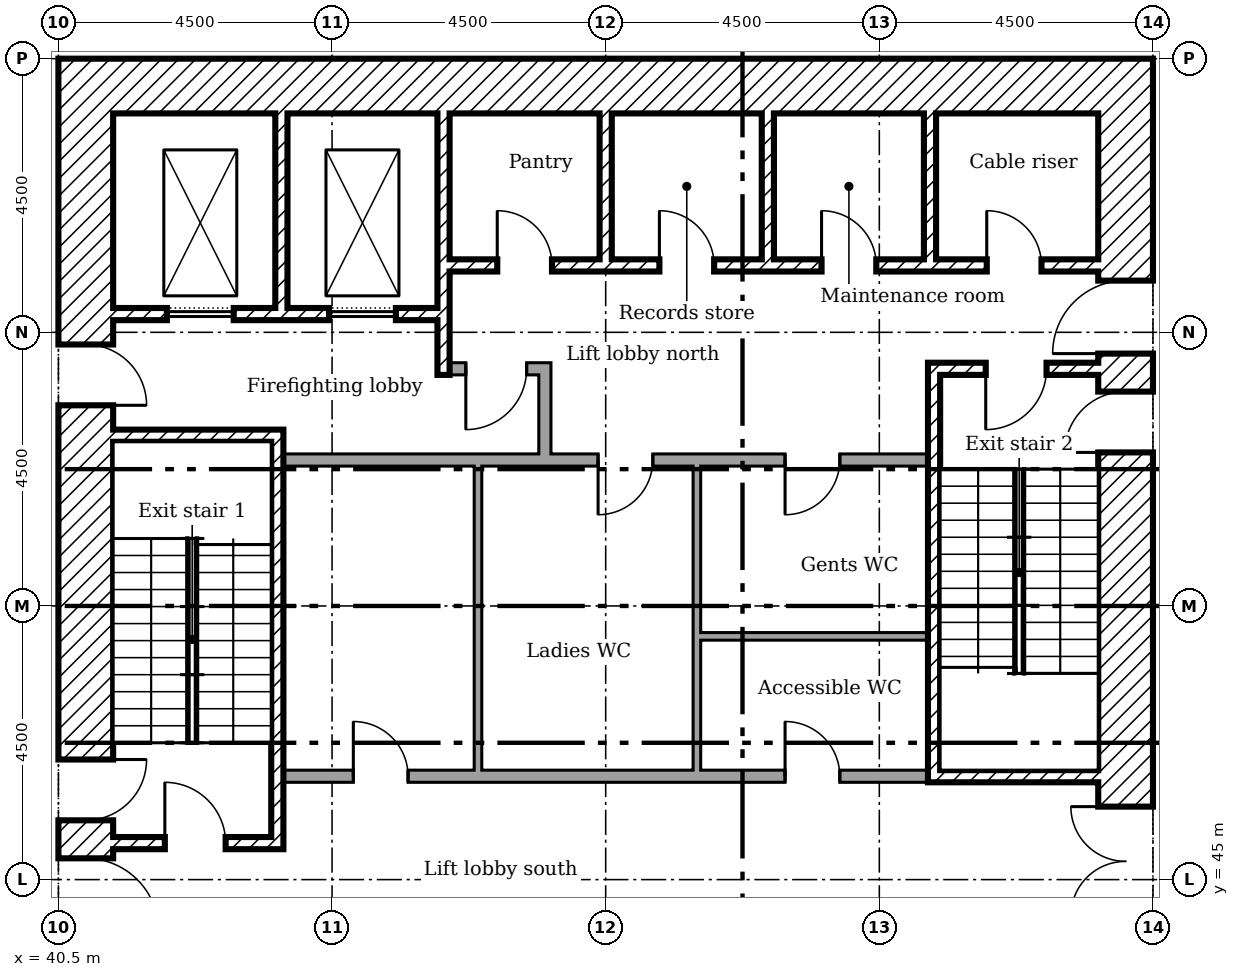
"""IFC4 building model, lengths in metres.
Left out: names, types, materials, properties, quantities, classifications, styles, units other than length and angle.
Written with IfcOpenShell. Run it as: python <this file> out.ifc"""

import sys

from ifc_helpers import new_model, si_unit, direction, frame, frame_2d, origin, place, context, subcontext, project, spatial, rectangle, extrude, element, fill, save


model = new_model("IFC4")
c1 = context("Model", 3, precision=1e-05, world=origin(), true_north=direction((0.0, 1.0)))
c2 = subcontext(c1, "Body", "Model", "MODEL_VIEW")
j1 = project(units=[si_unit("LENGTHUNIT", "METRE"), si_unit("PLANEANGLEUNIT", "RADIAN")], contexts=[c1])
p1 = place(None, origin())
s1 = spatial("IfcSite", under=j1, at=p1, CompositionType="ELEMENT")
p2 = place(p1, origin())
s2 = spatial("IfcBuilding", under=s1, at=p2, CompositionType="ELEMENT")
p3 = place(p2, frame((0.0, 0.0, 29.8)))
s3 = spatial("IfcBuildingStorey", under=s2, at=p3, CompositionType="ELEMENT", Elevation=29.8)
p4 = place(p3, frame((58.05, 40.5, 0.0), z_axis=(0.0, 0.0, 1.0), x_axis=(0.0, 1.0, 0.0)))
e1 = element("IfcWall", 1, at=p4, inside=s3, PredefinedType="SHEAR", context=c2, shape_type="SweptSolid", body=[
    extrude(rectangle(XDim=18.0, YDim=0.9, at=frame_2d((9.0, 0.0))), origin(), (0.0, 0.0, 1.0), 4.125),
])
p5 = place(p4, frame((13.15, 0.0, 0.0)))
e2 = element("IfcOpeningElement", 2, at=p5, cuts=e1, PredefinedType="OPENING", context=c2, shape_type="SweptSolid", body=[
    extrude(rectangle(XDim=1.2, YDim=2.1, at=frame_2d((0.6, 1.05))), frame((0.0, 0.46, 0.0), z_axis=(0.0, -1.0, 0.0), x_axis=(1.0, 0.0, 0.0)), (0.0, 0.0, 1.0), 0.92),
])
p6 = place(p4, frame((3.9, 0.0, 0.0)))
e3 = element("IfcOpeningElement", 3, at=p6, cuts=e1, PredefinedType="OPENING", context=c2, shape_type="SweptSolid", body=[
    extrude(rectangle(XDim=1.8, YDim=2.1, at=frame_2d((0.9, 1.05))), frame((0.0, 0.46, 0.0), z_axis=(0.0, -1.0, 0.0), x_axis=(1.0, 0.0, 0.0)), (0.0, 0.0, 1.0), 0.92),
])
p7 = place(p4, frame((11.525, 0.0, 0.0)))
e4 = element("IfcOpeningElement", 4, at=p7, cuts=e1, PredefinedType="OPENING", context=c2, shape_type="SweptSolid", body=[
    extrude(rectangle(XDim=1.0, YDim=2.1, at=frame_2d((0.5, 1.05))), frame((0.0, 0.46, 0.0), z_axis=(0.0, -1.0, 0.0), x_axis=(1.0, 0.0, 0.0)), (0.0, 0.0, 1.0), 0.92),
])
p8 = place(p3, frame((41.4, 58.05, 0.0)))
e5 = element("IfcWall", 5, at=p8, inside=s3, PredefinedType="SHEAR", context=c2, shape_type="SweptSolid", body=[
    extrude(rectangle(XDim=16.2, YDim=0.9, at=frame_2d((8.1, 0.0))), origin(), (0.0, 0.0, 1.0), 4.125),
])
p9 = place(p3, frame((40.95, 40.5, 0.0), z_axis=(0.0, 0.0, 1.0), x_axis=(0.0, 1.0, 0.0)))
e6 = element("IfcWall", 6, at=p9, inside=s3, PredefinedType="SHEAR", context=c2, shape_type="SweptSolid", body=[
    extrude(rectangle(XDim=18.0, YDim=0.9, at=frame_2d((9.0, 0.0))), origin(), (0.0, 0.0, 1.0), 4.125),
])
p10 = place(p9, frame((3.65, 0.0, 0.0)))
e7 = element("IfcOpeningElement", 7, at=p10, cuts=e6, PredefinedType="OPENING", context=c2, shape_type="SweptSolid", body=[
    extrude(rectangle(XDim=1.2, YDim=2.1, at=frame_2d((0.6, 1.05))), frame((0.0, 0.46, 0.0), z_axis=(0.0, -1.0, 0.0), x_axis=(1.0, 0.0, 0.0)), (0.0, 0.0, 1.0), 0.92),
])
p11 = place(p9, frame((5.475, 0.0, 0.0)))
e8 = element("IfcOpeningElement", 8, at=p11, cuts=e6, PredefinedType="OPENING", context=c2, shape_type="SweptSolid", body=[
    extrude(rectangle(XDim=1.0, YDim=2.1, at=frame_2d((0.5, 1.05))), frame((0.0, 0.46, 0.0), z_axis=(0.0, -1.0, 0.0), x_axis=(1.0, 0.0, 0.0)), (0.0, 0.0, 1.0), 0.92),
])
p12 = place(p9, frame((12.3, 0.0, 0.0)))
e9 = element("IfcOpeningElement", 9, at=p12, cuts=e6, PredefinedType="OPENING", context=c2, shape_type="SweptSolid", body=[
    extrude(rectangle(XDim=1.0, YDim=2.1, at=frame_2d((0.5, 1.05))), frame((0.0, 0.46, 0.0), z_axis=(0.0, -1.0, 0.0), x_axis=(1.0, 0.0, 0.0)), (0.0, 0.0, 1.0), 0.92),
])
p13 = place(p3, frame((44.167, 57.6, 0.0), z_axis=(0.0, 0.0, 1.0), x_axis=(0.0, -1.0, 0.0)))
e10 = element("IfcWall", 10, at=p13, inside=s3, PredefinedType="SHEAR", context=c2, shape_type="SweptSolid", body=[
    extrude(rectangle(XDim=3.2, YDim=0.2, at=frame_2d((1.6, 0.0))), origin(), (0.0, 0.0, 1.0), 4.125),
])
p14 = place(p3, frame((46.833, 57.6, 0.0), z_axis=(0.0, 0.0, 1.0), x_axis=(0.0, -1.0, 0.0)))
e11 = element("IfcWall", 11, at=p14, inside=s3, PredefinedType="SHEAR", context=c2, shape_type="SweptSolid", body=[
    extrude(rectangle(XDim=4.3, YDim=0.2, at=frame_2d((2.15, 0.0))), origin(), (0.0, 0.0, 1.0), 4.125),
])
for number, where, z_axis, x_axis in (
    (12, (49.5, 57.6, 0.0), (0.0, 0.0, 1.0), (0.0, -1.0, 0.0)),
    (13, (52.167, 57.6, 0.0), (0.0, 0.0, 1.0), (0.0, -1.0, 0.0)),
    (14, (54.833, 57.6, 0.0), (0.0, 0.0, 1.0), (0.0, -1.0, 0.0)),
):
    element("IfcWall", number, at=place(p3, frame(where, z_axis=z_axis, x_axis=x_axis)), inside=s3, PredefinedType="SHEAR", context=c2, shape_type="SweptSolid", body=[
        extrude(rectangle(XDim=2.4, YDim=0.2, at=frame_2d((1.2, 0.0))), origin(), (0.0, 0.0, 1.0), 4.125),
    ])
p15 = place(p3, frame((48.5, 51.9, 0.0), z_axis=(0.0, 0.0, 1.0), x_axis=(0.0, 1.0, 0.0)))
e15 = element("IfcWall", 15, at=p15, inside=s3, PredefinedType="PARTITIONING", context=c2, shape_type="SweptSolid", body=[
    extrude(rectangle(XDim=1.6, YDim=0.2, at=frame_2d((0.8, 0.0))), origin(), (0.0, 0.0, 1.0), 4.125),
])
p16 = place(p3, frame((46.933, 53.4, 0.0)))
e16 = element("IfcWall", 16, at=p16, inside=s3, PredefinedType="PARTITIONING", context=c2, shape_type="SweptSolid", body=[
    extrude(rectangle(XDim=1.467, YDim=0.2, at=frame_2d((0.733, 0.0))), origin(), (0.0, 0.0, 1.0), 4.125),
])
p17 = place(p16, frame((0.267, 0.0, 0.0)))
e17 = element("IfcOpeningElement", 17, at=p17, cuts=e16, PredefinedType="OPENING", context=c2, shape_type="SweptSolid", body=[
    extrude(rectangle(XDim=1.0, YDim=2.1, at=frame_2d((0.5, 1.05))), frame((0.0, 0.11, 0.0), z_axis=(0.0, -1.0, 0.0), x_axis=(1.0, 0.0, 0.0)), (0.0, 0.0, 1.0), 0.22),
])
p18 = place(p3, frame((46.933, 55.1, 0.0)))
e18 = element("IfcWall", 18, at=p18, inside=s3, PredefinedType="SHEAR", context=c2, shape_type="SweptSolid", body=[
    extrude(rectangle(XDim=10.667, YDim=0.2, at=frame_2d((5.333, 0.0))), origin(), (0.0, 0.0, 1.0), 4.125),
])
p19 = place(p18, frame((8.833, 0.0, 0.0)))
e19 = element("IfcOpeningElement", 19, at=p19, cuts=e18, PredefinedType="OPENING", context=c2, shape_type="SweptSolid", body=[
    extrude(rectangle(XDim=0.9, YDim=2.1, at=frame_2d((0.45, 1.05))), frame((0.0, 0.11, 0.0), z_axis=(0.0, -1.0, 0.0), x_axis=(1.0, 0.0, 0.0)), (0.0, 0.0, 1.0), 0.22),
])
p20 = place(p18, frame((0.783, 0.0, 0.0)))
e20 = element("IfcOpeningElement", 20, at=p20, cuts=e18, PredefinedType="OPENING", context=c2, shape_type="SweptSolid", body=[
    extrude(rectangle(XDim=0.9, YDim=2.1, at=frame_2d((0.45, 1.05))), frame((0.0, 0.11, 0.0), z_axis=(0.0, -1.0, 0.0), x_axis=(1.0, 0.0, 0.0)), (0.0, 0.0, 1.0), 0.22),
])
p21 = place(p18, frame((3.45, 0.0, 0.0)))
e21 = element("IfcOpeningElement", 21, at=p21, cuts=e18, PredefinedType="OPENING", context=c2, shape_type="SweptSolid", body=[
    extrude(rectangle(XDim=0.9, YDim=2.1, at=frame_2d((0.45, 1.05))), frame((0.0, 0.11, 0.0), z_axis=(0.0, -1.0, 0.0), x_axis=(1.0, 0.0, 0.0)), (0.0, 0.0, 1.0), 0.22),
])
p22 = place(p18, frame((6.117, 0.0, 0.0)))
e22 = element("IfcOpeningElement", 22, at=p22, cuts=e18, PredefinedType="OPENING", context=c2, shape_type="SweptSolid", body=[
    extrude(rectangle(XDim=0.9, YDim=2.1, at=frame_2d((0.45, 1.05))), frame((0.0, 0.11, 0.0), z_axis=(0.0, -1.0, 0.0), x_axis=(1.0, 0.0, 0.0)), (0.0, 0.0, 1.0), 0.22),
])
p23 = place(p3, frame((41.4, 54.3, 0.0)))
e23 = element("IfcWall", 23, at=p23, inside=s3, PredefinedType="SHEAR", context=c2, shape_type="SweptSolid", body=[
    extrude(rectangle(XDim=5.333, YDim=0.2, at=frame_2d((2.667, 0.0))), origin(), (0.0, 0.0, 1.0), 4.125),
])
p24 = place(p23, frame((0.883, 0.0, 0.0)))
e24 = element("IfcOpeningElement", 24, at=p24, cuts=e23, PredefinedType="OPENING", context=c2, shape_type="SweptSolid", body=[
    extrude(rectangle(XDim=1.1, YDim=2.1, at=frame_2d((0.55, 1.05))), frame((0.0, 0.11, 0.0), z_axis=(0.0, -1.0, 0.0), x_axis=(1.0, 0.0, 0.0)), (0.0, 0.0, 1.0), 0.22),
])
p25 = place(p23, frame((3.55, 0.0, 0.0)))
e25 = element("IfcOpeningElement", 25, at=p25, cuts=e23, PredefinedType="OPENING", context=c2, shape_type="SweptSolid", body=[
    extrude(rectangle(XDim=1.1, YDim=2.1, at=frame_2d((0.55, 1.05))), frame((0.0, 0.11, 0.0), z_axis=(0.0, -1.0, 0.0), x_axis=(1.0, 0.0, 0.0)), (0.0, 0.0, 1.0), 0.22),
])
p26 = place(p3, frame((44.1, 45.5, 0.0), z_axis=(0.0, 0.0, 1.0), x_axis=(0.0, 1.0, 0.0)))
e26 = element("IfcWall", 26, at=p26, inside=s3, PredefinedType="SHEAR", context=c2, shape_type="SweptSolid", body=[
    extrude(rectangle(XDim=6.9, YDim=0.2, at=frame_2d((3.45, 0.0))), origin(), (0.0, 0.0, 1.0), 4.125),
])
p27 = place(p3, frame((41.4, 52.3, 0.0)))
e27 = element("IfcWall", 27, at=p27, inside=s3, PredefinedType="SHEAR", context=c2, shape_type="SweptSolid", body=[
    extrude(rectangle(XDim=2.6, YDim=0.2, at=frame_2d((1.3, 0.0))), origin(), (0.0, 0.0, 1.0), 4.125),
])
p28 = place(p3, frame((41.4, 45.6, 0.0)))
e28 = element("IfcWall", 28, at=p28, inside=s3, PredefinedType="SHEAR", context=c2, shape_type="SweptSolid", body=[
    extrude(rectangle(XDim=2.6, YDim=0.2, at=frame_2d((1.3, 0.0))), origin(), (0.0, 0.0, 1.0), 4.125),
])
p29 = place(p28, frame((0.85, 0.0, 0.0)))
e29 = element("IfcOpeningElement", 29, at=p29, cuts=e28, PredefinedType="OPENING", context=c2, shape_type="SweptSolid", body=[
    extrude(rectangle(XDim=1.0, YDim=2.1, at=frame_2d((0.5, 1.05))), frame((0.0, 0.11, 0.0), z_axis=(0.0, -1.0, 0.0), x_axis=(1.0, 0.0, 0.0)), (0.0, 0.0, 1.0), 0.22),
])
p30 = place(p3, frame((54.8, 53.4, 0.0)))
e30 = element("IfcWall", 30, at=p30, inside=s3, PredefinedType="SHEAR", context=c2, shape_type="SweptSolid", body=[
    extrude(rectangle(XDim=2.8, YDim=0.2, at=frame_2d((1.4, 0.0))), origin(), (0.0, 0.0, 1.0), 4.125),
])
p31 = place(p30, frame((0.95, 0.0, 0.0)))
e31 = element("IfcOpeningElement", 31, at=p31, cuts=e30, PredefinedType="OPENING", context=c2, shape_type="SweptSolid", body=[
    extrude(rectangle(XDim=1.0, YDim=2.1, at=frame_2d((0.5, 1.05))), frame((0.0, 0.11, 0.0), z_axis=(0.0, -1.0, 0.0), x_axis=(1.0, 0.0, 0.0)), (0.0, 0.0, 1.0), 0.22),
])
p32 = place(p3, frame((54.8, 46.7, 0.0)))
e32 = element("IfcWall", 32, at=p32, inside=s3, PredefinedType="SHEAR", context=c2, shape_type="SweptSolid", body=[
    extrude(rectangle(XDim=2.8, YDim=0.2, at=frame_2d((1.4, 0.0))), origin(), (0.0, 0.0, 1.0), 4.125),
])
p33 = place(p3, frame((54.9, 46.8, 0.0), z_axis=(0.0, 0.0, 1.0), x_axis=(0.0, 1.0, 0.0)))
e33 = element("IfcWall", 33, at=p33, inside=s3, PredefinedType="SHEAR", context=c2, shape_type="SweptSolid", body=[
    extrude(rectangle(XDim=6.5, YDim=0.2, at=frame_2d((3.25, 0.0))), origin(), (0.0, 0.0, 1.0), 4.125),
])
p34 = place(p3, frame((44.2, 51.9, 0.0)))
e34 = element("IfcWall", 34, at=p34, inside=s3, PredefinedType="PARTITIONING", context=c2, shape_type="SweptSolid", body=[
    extrude(rectangle(XDim=10.6, YDim=0.2, at=frame_2d((5.3, 0.0))), origin(), (0.0, 0.0, 1.0), 4.125),
])
p35 = place(p34, frame((5.175, 0.0, 0.0)))
e35 = element("IfcOpeningElement", 35, at=p35, cuts=e34, PredefinedType="OPENING", context=c2, shape_type="SweptSolid", body=[
    extrude(rectangle(XDim=0.9, YDim=2.1, at=frame_2d((0.45, 1.05))), frame((0.0, 0.11, 0.0), z_axis=(0.0, -1.0, 0.0), x_axis=(1.0, 0.0, 0.0)), (0.0, 0.0, 1.0), 0.22),
])
p36 = place(p34, frame((8.25, 0.0, 0.0)))
e36 = element("IfcOpeningElement", 36, at=p36, cuts=e34, PredefinedType="OPENING", context=c2, shape_type="SweptSolid", body=[
    extrude(rectangle(XDim=0.9, YDim=2.1, at=frame_2d((0.45, 1.05))), frame((0.0, 0.11, 0.0), z_axis=(0.0, -1.0, 0.0), x_axis=(1.0, 0.0, 0.0)), (0.0, 0.0, 1.0), 0.22),
])
p37 = place(p3, frame((44.2, 46.7, 0.0)))
e37 = element("IfcWall", 37, at=p37, inside=s3, PredefinedType="PARTITIONING", context=c2, shape_type="SweptSolid", body=[
    extrude(rectangle(XDim=10.6, YDim=0.2, at=frame_2d((5.3, 0.0))), origin(), (0.0, 0.0, 1.0), 4.125),
])
p38 = place(p37, frame((1.15, 0.0, 0.0)))
e38 = element("IfcOpeningElement", 38, at=p38, cuts=e37, PredefinedType="OPENING", context=c2, shape_type="SweptSolid", body=[
    extrude(rectangle(XDim=0.9, YDim=2.1, at=frame_2d((0.45, 1.05))), frame((0.0, 0.11, 0.0), z_axis=(0.0, -1.0, 0.0), x_axis=(1.0, 0.0, 0.0)), (0.0, 0.0, 1.0), 0.22),
])
p39 = place(p37, frame((8.25, 0.0, 0.0)))
e39 = element("IfcOpeningElement", 39, at=p39, cuts=e37, PredefinedType="OPENING", context=c2, shape_type="SweptSolid", body=[
    extrude(rectangle(XDim=0.9, YDim=2.1, at=frame_2d((0.45, 1.05))), frame((0.0, 0.11, 0.0), z_axis=(0.0, -1.0, 0.0), x_axis=(1.0, 0.0, 0.0)), (0.0, 0.0, 1.0), 0.22),
])
p40 = place(p3, frame((47.4, 46.8, 0.0), z_axis=(0.0, 0.0, 1.0), x_axis=(0.0, 1.0, 0.0)))
e40 = element("IfcWall", 40, at=p40, inside=s3, PredefinedType="PARTITIONING", context=c2, shape_type="SweptSolid", body=[
    extrude(rectangle(XDim=5.0, YDim=0.125, at=frame_2d((2.5, 0.0))), origin(), (0.0, 0.0, 1.0), 4.125),
])
p41 = place(p3, frame((51.0, 46.8, 0.0), z_axis=(0.0, 0.0, 1.0), x_axis=(0.0, 1.0, 0.0)))
e41 = element("IfcWall", 41, at=p41, inside=s3, PredefinedType="PARTITIONING", context=c2, shape_type="SweptSolid", body=[
    extrude(rectangle(XDim=2.262, YDim=0.125, at=frame_2d((1.131, 0.0))), origin(), (0.0, 0.0, 1.0), 4.125),
])
p42 = place(p3, frame((54.8, 49.0, 0.0), z_axis=(0.0, 0.0, 1.0), x_axis=(-1.0, 0.0, 0.0)))
e42 = element("IfcWall", 42, at=p42, inside=s3, PredefinedType="PARTITIONING", context=c2, shape_type="SweptSolid", body=[
    extrude(rectangle(XDim=3.738, YDim=0.125, at=frame_2d((1.869, 0.0))), origin(), (0.0, 0.0, 1.0), 4.125),
])
p43 = place(p3, frame((51.0, 49.0, 0.0), z_axis=(0.0, 0.0, 1.0), x_axis=(0.0, 1.0, 0.0)))
e43 = element("IfcWall", 43, at=p43, inside=s3, PredefinedType="PARTITIONING", context=c2, shape_type="SweptSolid", body=[
    extrude(rectangle(XDim=2.8, YDim=0.125, at=frame_2d((1.4, 0.0))), origin(), (0.0, 0.0, 1.0), 4.125),
])
p44 = place(p5, origin())
e44 = element("IfcDoor", 44, at=p44, inside=s3, OperationType="SINGLE_SWING_RIGHT", PredefinedType="DOOR", context=c2, shape_type="SweptSolid", body=[
    extrude(rectangle(XDim=1.2, YDim=2.1, at=frame_2d((0.6, 1.05))), frame((0.0, 0.025, 0.0), z_axis=(0.0, -1.0, 0.0), x_axis=(1.0, 0.0, 0.0)), (0.0, 0.0, 1.0), 0.05),
])
fill(e2, e44)
p45 = place(p6, origin())
e45 = element("IfcDoor", 45, at=p45, inside=s3, OperationType="DOUBLE_DOOR_SINGLE_SWING", PredefinedType="DOOR", context=c2, shape_type="SweptSolid", body=[
    extrude(rectangle(XDim=1.8, YDim=2.1, at=frame_2d((0.9, 1.05))), frame((0.0, 0.025, 0.0), z_axis=(0.0, -1.0, 0.0), x_axis=(1.0, 0.0, 0.0)), (0.0, 0.0, 1.0), 0.05),
])
fill(e3, e45)
p46 = place(p10, frame((1.2, 0.0, 0.0), x_axis=(-1.0, 0.0, 0.0)))
e46 = element("IfcDoor", 46, at=p46, inside=s3, OperationType="SINGLE_SWING_LEFT", PredefinedType="DOOR", context=c2, shape_type="SweptSolid", body=[
    extrude(rectangle(XDim=1.2, YDim=2.1, at=frame_2d((0.6, 1.05))), frame((0.0, 0.025, 0.0), z_axis=(0.0, -1.0, 0.0), x_axis=(1.0, 0.0, 0.0)), (0.0, 0.0, 1.0), 0.05),
])
fill(e7, e46)
p47 = place(p29, origin())
e47 = element("IfcDoor", 47, at=p47, inside=s3, OperationType="SINGLE_SWING_RIGHT", PredefinedType="DOOR", context=c2, shape_type="SweptSolid", body=[
    extrude(rectangle(XDim=1.0, YDim=2.1, at=frame_2d((0.5, 1.05))), frame((0.0, 0.025, 0.0), z_axis=(0.0, -1.0, 0.0), x_axis=(1.0, 0.0, 0.0)), (0.0, 0.0, 1.0), 0.05),
])
fill(e29, e47)
p48 = place(p11, frame((1.0, 0.0, 0.0), x_axis=(-1.0, 0.0, 0.0)))
e48 = element("IfcDoor", 48, at=p48, inside=s3, OperationType="SINGLE_SWING_RIGHT", PredefinedType="DOOR", context=c2, shape_type="SweptSolid", body=[
    extrude(rectangle(XDim=1.0, YDim=2.1, at=frame_2d((0.5, 1.05))), frame((0.0, 0.025, 0.0), z_axis=(0.0, -1.0, 0.0), x_axis=(1.0, 0.0, 0.0)), (0.0, 0.0, 1.0), 0.05),
])
fill(e8, e48)
p49 = place(p31, frame((1.0, 0.0, 0.0), x_axis=(-1.0, 0.0, 0.0)))
e49 = element("IfcDoor", 49, at=p49, inside=s3, OperationType="SINGLE_SWING_LEFT", PredefinedType="DOOR", context=c2, shape_type="SweptSolid", body=[
    extrude(rectangle(XDim=1.0, YDim=2.1, at=frame_2d((0.5, 1.05))), frame((0.0, 0.025, 0.0), z_axis=(0.0, -1.0, 0.0), x_axis=(1.0, 0.0, 0.0)), (0.0, 0.0, 1.0), 0.05),
])
fill(e31, e49)
p50 = place(p7, origin())
e50 = element("IfcDoor", 50, at=p50, inside=s3, OperationType="SINGLE_SWING_RIGHT", PredefinedType="DOOR", context=c2, shape_type="SweptSolid", body=[
    extrude(rectangle(XDim=1.0, YDim=2.1, at=frame_2d((0.5, 1.05))), frame((0.0, 0.025, 0.0), z_axis=(0.0, -1.0, 0.0), x_axis=(1.0, 0.0, 0.0)), (0.0, 0.0, 1.0), 0.05),
])
fill(e4, e50)
p51 = place(p17, frame((1.0, 0.0, 0.0), x_axis=(-1.0, 0.0, 0.0)))
e51 = element("IfcDoor", 51, at=p51, inside=s3, OperationType="SINGLE_SWING_LEFT", PredefinedType="DOOR", context=c2, shape_type="SweptSolid", body=[
    extrude(rectangle(XDim=1.0, YDim=2.1, at=frame_2d((0.5, 1.05))), frame((0.0, 0.025, 0.0), z_axis=(0.0, -1.0, 0.0), x_axis=(1.0, 0.0, 0.0)), (0.0, 0.0, 1.0), 0.05),
])
fill(e17, e51)
p52 = place(p12, frame((1.0, 0.0, 0.0), x_axis=(-1.0, 0.0, 0.0)))
e52 = element("IfcDoor", 52, at=p52, inside=s3, OperationType="SINGLE_SWING_LEFT", PredefinedType="DOOR", context=c2, shape_type="SweptSolid", body=[
    extrude(rectangle(XDim=1.0, YDim=2.1, at=frame_2d((0.5, 1.05))), frame((0.0, 0.025, 0.0), z_axis=(0.0, -1.0, 0.0), x_axis=(1.0, 0.0, 0.0)), (0.0, 0.0, 1.0), 0.05),
])
fill(e9, e52)
p53 = place(p19, origin())
e53 = element("IfcDoor", 53, at=p53, inside=s3, OperationType="SINGLE_SWING_RIGHT", PredefinedType="DOOR", context=c2, shape_type="SweptSolid", body=[
    extrude(rectangle(XDim=0.9, YDim=2.1, at=frame_2d((0.45, 1.05))), frame((0.0, 0.025, 0.0), z_axis=(0.0, -1.0, 0.0), x_axis=(1.0, 0.0, 0.0)), (0.0, 0.0, 1.0), 0.05),
])
fill(e19, e53)
p54 = place(p20, origin())
e54 = element("IfcDoor", 54, at=p54, inside=s3, OperationType="SINGLE_SWING_RIGHT", PredefinedType="DOOR", context=c2, shape_type="SweptSolid", body=[
    extrude(rectangle(XDim=0.9, YDim=2.1, at=frame_2d((0.45, 1.05))), frame((0.0, 0.025, 0.0), z_axis=(0.0, -1.0, 0.0), x_axis=(1.0, 0.0, 0.0)), (0.0, 0.0, 1.0), 0.05),
])
fill(e20, e54)
p55 = place(p21, origin())
e55 = element("IfcDoor", 55, at=p55, inside=s3, OperationType="SINGLE_SWING_RIGHT", PredefinedType="DOOR", context=c2, shape_type="SweptSolid", body=[
    extrude(rectangle(XDim=0.9, YDim=2.1, at=frame_2d((0.45, 1.05))), frame((0.0, 0.025, 0.0), z_axis=(0.0, -1.0, 0.0), x_axis=(1.0, 0.0, 0.0)), (0.0, 0.0, 1.0), 0.05),
])
fill(e21, e55)
p56 = place(p22, origin())
e56 = element("IfcDoor", 56, at=p56, inside=s3, OperationType="SINGLE_SWING_RIGHT", PredefinedType="DOOR", context=c2, shape_type="SweptSolid", body=[
    extrude(rectangle(XDim=0.9, YDim=2.1, at=frame_2d((0.45, 1.05))), frame((0.0, 0.025, 0.0), z_axis=(0.0, -1.0, 0.0), x_axis=(1.0, 0.0, 0.0)), (0.0, 0.0, 1.0), 0.05),
])
fill(e22, e56)
p57 = place(p38, origin())
e57 = element("IfcDoor", 57, at=p57, inside=s3, OperationType="SINGLE_SWING_RIGHT", PredefinedType="DOOR", context=c2, shape_type="SweptSolid", body=[
    extrude(rectangle(XDim=0.9, YDim=2.1, at=frame_2d((0.45, 1.05))), frame((0.0, 0.025, 0.0), z_axis=(0.0, -1.0, 0.0), x_axis=(1.0, 0.0, 0.0)), (0.0, 0.0, 1.0), 0.05),
])
fill(e38, e57)
p58 = place(p35, frame((0.9, 0.0, 0.0), x_axis=(-1.0, 0.0, 0.0)))
e58 = element("IfcDoor", 58, at=p58, inside=s3, OperationType="SINGLE_SWING_LEFT", PredefinedType="DOOR", context=c2, shape_type="SweptSolid", body=[
    extrude(rectangle(XDim=0.9, YDim=2.1, at=frame_2d((0.45, 1.05))), frame((0.0, 0.025, 0.0), z_axis=(0.0, -1.0, 0.0), x_axis=(1.0, 0.0, 0.0)), (0.0, 0.0, 1.0), 0.05),
])
fill(e35, e58)
p59 = place(p39, origin())
e59 = element("IfcDoor", 59, at=p59, inside=s3, OperationType="SINGLE_SWING_RIGHT", PredefinedType="DOOR", context=c2, shape_type="SweptSolid", body=[
    extrude(rectangle(XDim=0.9, YDim=2.1, at=frame_2d((0.45, 1.05))), frame((0.0, 0.025, 0.0), z_axis=(0.0, -1.0, 0.0), x_axis=(1.0, 0.0, 0.0)), (0.0, 0.0, 1.0), 0.05),
])
fill(e39, e59)
p60 = place(p36, frame((0.9, 0.0, 0.0), x_axis=(-1.0, 0.0, 0.0)))
e60 = element("IfcDoor", 60, at=p60, inside=s3, OperationType="SINGLE_SWING_LEFT", PredefinedType="DOOR", context=c2, shape_type="SweptSolid", body=[
    extrude(rectangle(XDim=0.9, YDim=2.1, at=frame_2d((0.45, 1.05))), frame((0.0, 0.025, 0.0), z_axis=(0.0, -1.0, 0.0), x_axis=(1.0, 0.0, 0.0)), (0.0, 0.0, 1.0), 0.05),
])
fill(e36, e60)
p61 = place(p24, origin())
e61 = element("IfcDoor", 61, at=p61, inside=s3, OperationType="SLIDING_TO_LEFT", PredefinedType="DOOR", context=c2, shape_type="SweptSolid", body=[
    extrude(rectangle(XDim=1.1, YDim=2.1, at=frame_2d((0.55, 1.05))), frame((0.0, 0.025, 0.0), z_axis=(0.0, -1.0, 0.0), x_axis=(1.0, 0.0, 0.0)), (0.0, 0.0, 1.0), 0.05),
])
fill(e24, e61)
p62 = place(p25, origin())
e62 = element("IfcDoor", 62, at=p62, inside=s3, OperationType="SLIDING_TO_LEFT", PredefinedType="DOOR", context=c2, shape_type="SweptSolid", body=[
    extrude(rectangle(XDim=1.1, YDim=2.1, at=frame_2d((0.55, 1.05))), frame((0.0, 0.025, 0.0), z_axis=(0.0, -1.0, 0.0), x_axis=(1.0, 0.0, 0.0)), (0.0, 0.0, 1.0), 0.05),
])
fill(e25, e62)
save(model, sys.argv[1])
